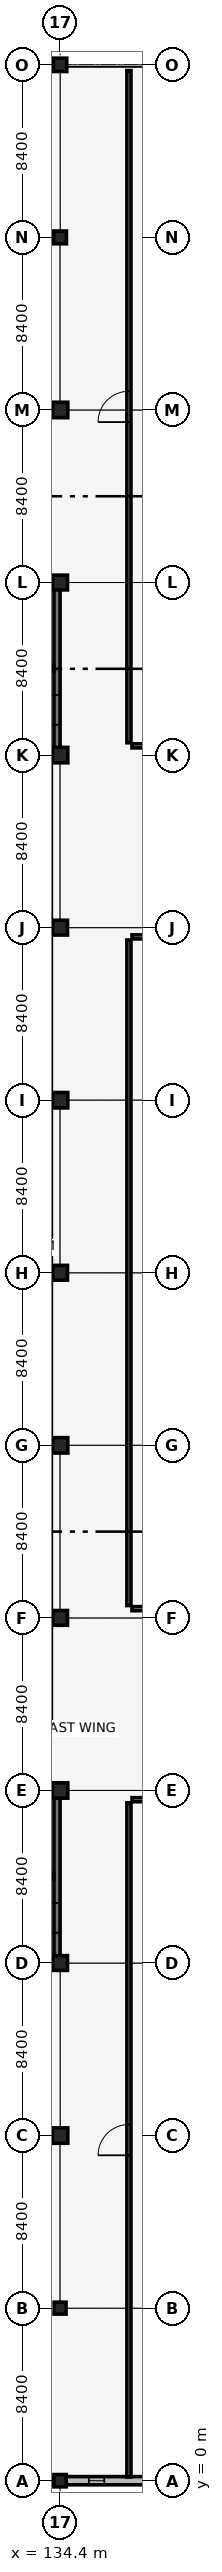
"""IFC4 building model, lengths in metres.
Left out: names, types, materials, properties, quantities, classifications, styles, units other than length and angle.
Written with IfcOpenShell. Run it as: python <this file> out.ifc"""

import sys

from ifc_helpers import new_model, si_unit, direction, frame, frame_2d, origin, origin_2d, place, context, subcontext, project, spatial, rectangle, extrude, element, fill, save


model = new_model("IFC4")
c1 = context("Model", 3, precision=1e-05, world=origin(), true_north=direction((0.0, 1.0)))
c2 = subcontext(c1, "Body", "Model", "MODEL_VIEW")
j1 = project(units=[si_unit("LENGTHUNIT", "METRE"), si_unit("PLANEANGLEUNIT", "RADIAN")], contexts=[c1])
p1 = place(None, origin())
s1 = spatial("IfcSite", under=j1, at=p1, CompositionType="ELEMENT")
p2 = place(p1, origin())
s2 = spatial("IfcBuilding", under=s1, at=p2, CompositionType="ELEMENT")
p3 = place(p2, frame((0.0, 0.0, 5.44)))
s3 = spatial("IfcBuildingStorey", under=s2, at=p3, CompositionType="ELEMENT", Elevation=5.44)
p4 = place(p3, frame((126.15, 25.35, 0.0), z_axis=(0.0, 0.0, 1.0), x_axis=(1.0, 0.0, 0.0)))
e1 = element("IfcWall", 1, at=p4, inside=s3, PredefinedType="SHEAR", context=c2, shape_type="SweptSolid", body=[
    extrude(rectangle(XDim=8.1, YDim=0.3, at=frame_2d((4.05, 0.0))), origin(), (0.0, 0.0, 1.0), 4.12),
])
p5 = place(p4, frame((0.485, 0.0, 0.0)))
e2 = element("IfcOpeningElement", 2, at=p5, cuts=e1, PredefinedType="OPENING", context=c2, shape_type="SweptSolid", body=[
    extrude(rectangle(XDim=1.0, YDim=2.15, at=frame_2d((0.5, 1.075))), frame((0.0, 0.16, 0.0), z_axis=(0.0, -1.0, 0.0), x_axis=(1.0, 0.0, 0.0)), (0.0, 0.0, 1.0), 0.32),
])
p6 = place(p3, frame((126.15, 33.45, 0.0), z_axis=(0.0, 0.0, 1.0), x_axis=(1.0, 0.0, 0.0)))
e3 = element("IfcWall", 3, at=p6, inside=s3, PredefinedType="SHEAR", context=c2, shape_type="SweptSolid", body=[
    extrude(rectangle(XDim=8.1, YDim=0.3, at=frame_2d((4.05, 0.0))), origin(), (0.0, 0.0, 1.0), 4.12),
])
p7 = place(p3, frame((134.25, 25.35, 0.0), z_axis=(0.0, 0.0, 1.0), x_axis=(0.0, 1.0, 0.0)))
e4 = element("IfcWall", 4, at=p7, inside=s3, PredefinedType="SHEAR", context=c2, shape_type="SweptSolid", body=[
    extrude(rectangle(XDim=8.1, YDim=0.3, at=frame_2d((4.05, 0.0))), origin(), (0.0, 0.0, 1.0), 4.12),
])
p8 = place(p7, frame((1.325, 0.0, 0.0)))
e5 = element("IfcOpeningElement", 5, at=p8, cuts=e4, PredefinedType="OPENING", context=c2, shape_type="SweptSolid", body=[
    extrude(rectangle(XDim=1.45, YDim=2.15, at=frame_2d((0.725, 1.075))), frame((0.0, 0.16, 0.0), z_axis=(0.0, -1.0, 0.0), x_axis=(1.0, 0.0, 0.0)), (0.0, 0.0, 1.0), 0.32),
])
p9 = place(p3, frame((126.3, 29.43, 0.0), z_axis=(0.0, 0.0, 1.0), x_axis=(1.0, 0.0, 0.0)))
e6 = element("IfcWall", 6, at=p9, inside=s3, PredefinedType="SHEAR", context=c2, shape_type="SweptSolid", body=[
    extrude(rectangle(XDim=7.8, YDim=0.3, at=frame_2d((3.9, 0.0))), origin(), (0.0, 0.0, 1.0), 4.12),
])
p10 = place(p9, frame((6.2, 0.0, 0.0)))
e7 = element("IfcOpeningElement", 7, at=p10, cuts=e6, PredefinedType="OPENING", context=c2, shape_type="SweptSolid", body=[
    extrude(rectangle(XDim=1.35, YDim=2.15, at=frame_2d((0.675, 1.075))), frame((0.0, 0.16, 0.0), z_axis=(0.0, -1.0, 0.0), x_axis=(1.0, 0.0, 0.0)), (0.0, 0.0, 1.0), 0.32),
])
p11 = place(p3, frame((126.15, 84.15, 0.0), z_axis=(0.0, 0.0, 1.0), x_axis=(1.0, 0.0, 0.0)))
e8 = element("IfcWall", 8, at=p11, inside=s3, PredefinedType="SHEAR", context=c2, shape_type="SweptSolid", body=[
    extrude(rectangle(XDim=8.1, YDim=0.3, at=frame_2d((4.05, 0.0))), origin(), (0.0, 0.0, 1.0), 4.12),
])
p12 = place(p11, frame((0.485, 0.0, 0.0)))
e9 = element("IfcOpeningElement", 9, at=p12, cuts=e8, PredefinedType="OPENING", context=c2, shape_type="SweptSolid", body=[
    extrude(rectangle(XDim=1.0, YDim=2.15, at=frame_2d((0.5, 1.075))), frame((0.0, 0.16, 0.0), z_axis=(0.0, -1.0, 0.0), x_axis=(1.0, 0.0, 0.0)), (0.0, 0.0, 1.0), 0.32),
])
p13 = place(p3, frame((126.15, 92.25, 0.0), z_axis=(0.0, 0.0, 1.0), x_axis=(1.0, 0.0, 0.0)))
e10 = element("IfcWall", 10, at=p13, inside=s3, PredefinedType="SHEAR", context=c2, shape_type="SweptSolid", body=[
    extrude(rectangle(XDim=8.1, YDim=0.3, at=frame_2d((4.05, 0.0))), origin(), (0.0, 0.0, 1.0), 4.12),
])
p14 = place(p3, frame((134.25, 84.15, 0.0), z_axis=(0.0, 0.0, 1.0), x_axis=(0.0, 1.0, 0.0)))
e11 = element("IfcWall", 11, at=p14, inside=s3, PredefinedType="SHEAR", context=c2, shape_type="SweptSolid", body=[
    extrude(rectangle(XDim=8.1, YDim=0.3, at=frame_2d((4.05, 0.0))), origin(), (0.0, 0.0, 1.0), 4.12),
])
p15 = place(p14, frame((1.325, 0.0, 0.0)))
e12 = element("IfcOpeningElement", 12, at=p15, cuts=e11, PredefinedType="OPENING", context=c2, shape_type="SweptSolid", body=[
    extrude(rectangle(XDim=1.45, YDim=2.15, at=frame_2d((0.725, 1.075))), frame((0.0, 0.16, 0.0), z_axis=(0.0, -1.0, 0.0), x_axis=(1.0, 0.0, 0.0)), (0.0, 0.0, 1.0), 0.32),
])
p16 = place(p3, frame((126.3, 88.23, 0.0), z_axis=(0.0, 0.0, 1.0), x_axis=(1.0, 0.0, 0.0)))
e13 = element("IfcWall", 13, at=p16, inside=s3, PredefinedType="SHEAR", context=c2, shape_type="SweptSolid", body=[
    extrude(rectangle(XDim=7.8, YDim=0.3, at=frame_2d((3.9, 0.0))), origin(), (0.0, 0.0, 1.0), 4.12),
])
p17 = place(p16, frame((6.2, 0.0, 0.0)))
e14 = element("IfcOpeningElement", 14, at=p17, cuts=e13, PredefinedType="OPENING", context=c2, shape_type="SweptSolid", body=[
    extrude(rectangle(XDim=1.35, YDim=2.15, at=frame_2d((0.675, 1.075))), frame((0.0, 0.16, 0.0), z_axis=(0.0, -1.0, 0.0), x_axis=(1.0, 0.0, 0.0)), (0.0, 0.0, 1.0), 0.32),
])
p18 = place(p3, frame((134.4, 0.0, 0.0), z_axis=(0.0, 0.0, 1.0), x_axis=(1.0, 0.0, 0.0)))
e15 = element("IfcColumn", 15, at=p18, inside=s3, PredefinedType="COLUMN", context=c2, shape_type="SweptSolid", body=[
    extrude(rectangle(XDim=0.6, YDim=0.6, at=origin_2d()), origin(), (0.0, 0.0, 1.0), 4.12),
])
p19 = place(p3, frame((134.4, 8.4, 0.0), z_axis=(0.0, 0.0, 1.0), x_axis=(1.0, 0.0, 0.0)))
e16 = element("IfcColumn", 16, at=p19, inside=s3, PredefinedType="COLUMN", context=c2, shape_type="SweptSolid", body=[
    extrude(rectangle(XDim=0.58, YDim=0.58, at=origin_2d()), origin(), (0.0, 0.0, 1.0), 4.12),
])
p20 = place(p3, frame((134.4, 16.8, 0.0), z_axis=(0.0, 0.0, 1.0), x_axis=(1.0, 0.0, 0.0)))
e17 = element("IfcColumn", 17, at=p20, inside=s3, PredefinedType="COLUMN", context=c2, shape_type="SweptSolid", body=[
    extrude(rectangle(XDim=0.75, YDim=0.75, at=origin_2d()), origin(), (0.0, 0.0, 1.0), 4.12),
])
p21 = place(p3, frame((134.4, 25.2, 0.0), z_axis=(0.0, 0.0, 1.0), x_axis=(1.0, 0.0, 0.0)))
e18 = element("IfcColumn", 18, at=p21, inside=s3, PredefinedType="COLUMN", context=c2, shape_type="SweptSolid", body=[
    extrude(rectangle(XDim=0.72, YDim=0.72, at=origin_2d()), origin(), (0.0, 0.0, 1.0), 4.12),
])
p22 = place(p3, frame((134.4, 33.6, 0.0), z_axis=(0.0, 0.0, 1.0), x_axis=(1.0, 0.0, 0.0)))
e19 = element("IfcColumn", 19, at=p22, inside=s3, PredefinedType="COLUMN", context=c2, shape_type="SweptSolid", body=[
    extrude(rectangle(XDim=0.75, YDim=0.75, at=origin_2d()), origin(), (0.0, 0.0, 1.0), 4.12),
])
p23 = place(p3, frame((134.4, 42.0, 0.0), z_axis=(0.0, 0.0, 1.0), x_axis=(1.0, 0.0, 0.0)))
e20 = element("IfcColumn", 20, at=p23, inside=s3, PredefinedType="COLUMN", context=c2, shape_type="SweptSolid", body=[
    extrude(rectangle(XDim=0.72, YDim=0.72, at=origin_2d()), origin(), (0.0, 0.0, 1.0), 4.12),
])
p24 = place(p3, frame((134.4, 50.4, 0.0), z_axis=(0.0, 0.0, 1.0), x_axis=(1.0, 0.0, 0.0)))
e21 = element("IfcColumn", 21, at=p24, inside=s3, PredefinedType="COLUMN", context=c2, shape_type="SweptSolid", body=[
    extrude(rectangle(XDim=0.75, YDim=0.75, at=origin_2d()), origin(), (0.0, 0.0, 1.0), 4.12),
])
p25 = place(p3, frame((134.4, 58.8, 0.0), z_axis=(0.0, 0.0, 1.0), x_axis=(1.0, 0.0, 0.0)))
e22 = element("IfcColumn", 22, at=p25, inside=s3, PredefinedType="COLUMN", context=c2, shape_type="SweptSolid", body=[
    extrude(rectangle(XDim=0.72, YDim=0.72, at=origin_2d()), origin(), (0.0, 0.0, 1.0), 4.12),
])
p26 = place(p3, frame((134.4, 67.2, 0.0), z_axis=(0.0, 0.0, 1.0), x_axis=(1.0, 0.0, 0.0)))
e23 = element("IfcColumn", 23, at=p26, inside=s3, PredefinedType="COLUMN", context=c2, shape_type="SweptSolid", body=[
    extrude(rectangle(XDim=0.75, YDim=0.75, at=origin_2d()), origin(), (0.0, 0.0, 1.0), 4.12),
])
p27 = place(p3, frame((134.4, 75.6, 0.0), z_axis=(0.0, 0.0, 1.0), x_axis=(1.0, 0.0, 0.0)))
e24 = element("IfcColumn", 24, at=p27, inside=s3, PredefinedType="COLUMN", context=c2, shape_type="SweptSolid", body=[
    extrude(rectangle(XDim=0.72, YDim=0.72, at=origin_2d()), origin(), (0.0, 0.0, 1.0), 4.12),
])
p28 = place(p3, frame((134.4, 84.0, 0.0), z_axis=(0.0, 0.0, 1.0), x_axis=(1.0, 0.0, 0.0)))
e25 = element("IfcColumn", 25, at=p28, inside=s3, PredefinedType="COLUMN", context=c2, shape_type="SweptSolid", body=[
    extrude(rectangle(XDim=0.75, YDim=0.75, at=origin_2d()), origin(), (0.0, 0.0, 1.0), 4.12),
])
p29 = place(p3, frame((134.4, 92.4, 0.0), z_axis=(0.0, 0.0, 1.0), x_axis=(1.0, 0.0, 0.0)))
e26 = element("IfcColumn", 26, at=p29, inside=s3, PredefinedType="COLUMN", context=c2, shape_type="SweptSolid", body=[
    extrude(rectangle(XDim=0.72, YDim=0.72, at=origin_2d()), origin(), (0.0, 0.0, 1.0), 4.12),
])
p30 = place(p3, frame((134.4, 100.8, 0.0), z_axis=(0.0, 0.0, 1.0), x_axis=(1.0, 0.0, 0.0)))
e27 = element("IfcColumn", 27, at=p30, inside=s3, PredefinedType="COLUMN", context=c2, shape_type="SweptSolid", body=[
    extrude(rectangle(XDim=0.75, YDim=0.75, at=origin_2d()), origin(), (0.0, 0.0, 1.0), 4.12),
])
p31 = place(p3, frame((134.4, 109.2, 0.0), z_axis=(0.0, 0.0, 1.0), x_axis=(1.0, 0.0, 0.0)))
e28 = element("IfcColumn", 28, at=p31, inside=s3, PredefinedType="COLUMN", context=c2, shape_type="SweptSolid", body=[
    extrude(rectangle(XDim=0.62, YDim=0.62, at=origin_2d()), origin(), (0.0, 0.0, 1.0), 4.12),
])
p32 = place(p3, frame((134.4, 117.6, 0.0), z_axis=(0.0, 0.0, 1.0), x_axis=(1.0, 0.0, 0.0)))
e29 = element("IfcColumn", 29, at=p32, inside=s3, PredefinedType="COLUMN", context=c2, shape_type="SweptSolid", body=[
    extrude(rectangle(XDim=0.65, YDim=0.65, at=origin_2d()), origin(), (0.0, 0.0, 1.0), 4.12),
])
p33 = place(p3, frame((126.275, 0.0, 0.0), z_axis=(0.0, 0.0, 1.0), x_axis=(1.0, 0.0, 0.0)))
e30 = element("IfcWall", 30, at=p33, inside=s3, PredefinedType="SOLIDWALL", context=c2, shape_type="SweptSolid", body=[
    extrude(rectangle(XDim=7.84, YDim=0.38, at=frame_2d((3.92, 0.0))), origin(), (0.0, 0.0, 1.0), 3.38),
])
p34 = place(p33, frame((1.115, 0.0, 0.7)))
e31 = element("IfcOpeningElement", 31, at=p34, cuts=e30, PredefinedType="OPENING", context=c2, shape_type="SweptSolid", body=[
    extrude(rectangle(XDim=0.75, YDim=2.1, at=frame_2d((0.375, 1.05))), frame((0.0, 0.2, 0.0), z_axis=(0.0, -1.0, 0.0), x_axis=(1.0, 0.0, 0.0)), (0.0, 0.0, 1.0), 0.4),
])
p35 = place(p33, frame((2.683, 0.0, 0.7)))
e32 = element("IfcOpeningElement", 32, at=p35, cuts=e30, PredefinedType="OPENING", context=c2, shape_type="SweptSolid", body=[
    extrude(rectangle(XDim=0.75, YDim=2.1, at=frame_2d((0.375, 1.05))), frame((0.0, 0.2, 0.0), z_axis=(0.0, -1.0, 0.0), x_axis=(1.0, 0.0, 0.0)), (0.0, 0.0, 1.0), 0.4),
])
p36 = place(p33, frame((4.407, 0.0, 0.7)))
e33 = element("IfcOpeningElement", 33, at=p36, cuts=e30, PredefinedType="OPENING", context=c2, shape_type="SweptSolid", body=[
    extrude(rectangle(XDim=0.75, YDim=2.1, at=frame_2d((0.375, 1.05))), frame((0.0, 0.2, 0.0), z_axis=(0.0, -1.0, 0.0), x_axis=(1.0, 0.0, 0.0)), (0.0, 0.0, 1.0), 0.4),
])
p37 = place(p33, frame((5.975, 0.0, 0.7)))
e34 = element("IfcOpeningElement", 34, at=p37, cuts=e30, PredefinedType="OPENING", context=c2, shape_type="SweptSolid", body=[
    extrude(rectangle(XDim=0.75, YDim=2.1, at=frame_2d((0.375, 1.05))), frame((0.0, 0.2, 0.0), z_axis=(0.0, -1.0, 0.0), x_axis=(1.0, 0.0, 0.0)), (0.0, 0.0, 1.0), 0.4),
])
p38 = place(p3, frame((126.295, 117.6, 0.0), z_axis=(0.0, 0.0, 1.0), x_axis=(1.0, 0.0, 0.0)))
e35 = element("IfcWall", 35, at=p38, inside=s3, PredefinedType="SOLIDWALL", context=c2, shape_type="SweptSolid", body=[
    extrude(rectangle(XDim=7.795, YDim=0.38, at=frame_2d((3.897, 0.0))), origin(), (0.0, 0.0, 1.0), 3.38),
])
p39 = place(p38, frame((1.106, 0.0, 0.7)))
e36 = element("IfcOpeningElement", 36, at=p39, cuts=e35, PredefinedType="OPENING", context=c2, shape_type="SweptSolid", body=[
    extrude(rectangle(XDim=0.75, YDim=2.1, at=frame_2d((0.375, 1.05))), frame((0.0, 0.2, 0.0), z_axis=(0.0, -1.0, 0.0), x_axis=(1.0, 0.0, 0.0)), (0.0, 0.0, 1.0), 0.4),
])
p40 = place(p38, frame((2.665, 0.0, 0.7)))
e37 = element("IfcOpeningElement", 37, at=p40, cuts=e35, PredefinedType="OPENING", context=c2, shape_type="SweptSolid", body=[
    extrude(rectangle(XDim=0.75, YDim=2.1, at=frame_2d((0.375, 1.05))), frame((0.0, 0.2, 0.0), z_axis=(0.0, -1.0, 0.0), x_axis=(1.0, 0.0, 0.0)), (0.0, 0.0, 1.0), 0.4),
])
p41 = place(p38, frame((4.38, 0.0, 0.7)))
e38 = element("IfcOpeningElement", 38, at=p41, cuts=e35, PredefinedType="OPENING", context=c2, shape_type="SweptSolid", body=[
    extrude(rectangle(XDim=0.75, YDim=2.1, at=frame_2d((0.375, 1.05))), frame((0.0, 0.2, 0.0), z_axis=(0.0, -1.0, 0.0), x_axis=(1.0, 0.0, 0.0)), (0.0, 0.0, 1.0), 0.4),
])
p42 = place(p38, frame((5.939, 0.0, 0.7)))
e39 = element("IfcOpeningElement", 39, at=p42, cuts=e35, PredefinedType="OPENING", context=c2, shape_type="SweptSolid", body=[
    extrude(rectangle(XDim=0.75, YDim=2.1, at=frame_2d((0.375, 1.05))), frame((0.0, 0.2, 0.0), z_axis=(0.0, -1.0, 0.0), x_axis=(1.0, 0.0, 0.0)), (0.0, 0.0, 1.0), 0.4),
])
p43 = place(p3, frame((134.685, 0.0, 0.0), z_axis=(0.0, 0.0, 1.0), x_axis=(1.0, 0.0, 0.0)))
e40 = element("IfcWall", 40, at=p43, inside=s3, PredefinedType="SOLIDWALL", context=c2, shape_type="SweptSolid", body=[
    extrude(rectangle(XDim=7.84, YDim=0.4, at=frame_2d((3.92, 0.0))), origin(), (0.0, 0.0, 1.0), 3.38),
])
p44 = place(p43, frame((1.115, 0.0, 0.7)))
e41 = element("IfcOpeningElement", 41, at=p44, cuts=e40, PredefinedType="OPENING", context=c2, shape_type="SweptSolid", body=[
    extrude(rectangle(XDim=0.75, YDim=2.1, at=frame_2d((0.375, 1.05))), frame((0.0, 0.21, 0.0), z_axis=(0.0, -1.0, 0.0), x_axis=(1.0, 0.0, 0.0)), (0.0, 0.0, 1.0), 0.42),
])
p45 = place(p43, frame((4.407, 0.0, 0.7)))
e42 = element("IfcOpeningElement", 42, at=p45, cuts=e40, PredefinedType="OPENING", context=c2, shape_type="SweptSolid", body=[
    extrude(rectangle(XDim=0.75, YDim=2.1, at=frame_2d((0.375, 1.05))), frame((0.0, 0.21, 0.0), z_axis=(0.0, -1.0, 0.0), x_axis=(1.0, 0.0, 0.0)), (0.0, 0.0, 1.0), 0.42),
])
p46 = place(p43, frame((5.975, 0.0, 0.7)))
e43 = element("IfcOpeningElement", 43, at=p46, cuts=e40, PredefinedType="OPENING", context=c2, shape_type="SweptSolid", body=[
    extrude(rectangle(XDim=0.75, YDim=2.1, at=frame_2d((0.375, 1.05))), frame((0.0, 0.21, 0.0), z_axis=(0.0, -1.0, 0.0), x_axis=(1.0, 0.0, 0.0)), (0.0, 0.0, 1.0), 0.42),
])
p47 = place(p3, frame((137.75, 0.18, 0.0), z_axis=(0.0, 0.0, 1.0), x_axis=(0.0, 1.0, 0.0)))
e44 = element("IfcWall", 44, at=p47, inside=s3, PredefinedType="PARTITIONING", context=c2, shape_type="SweptSolid", body=[
    extrude(rectangle(XDim=32.82, YDim=0.2, at=frame_2d((16.41, 0.0))), origin(), (0.0, 0.0, 1.0), 3.34),
])
p48 = place(p47, frame((15.66, 0.0, 0.0)))
e45 = element("IfcOpeningElement", 45, at=p48, cuts=e44, PredefinedType="OPENING", context=c2, shape_type="SweptSolid", body=[
    extrude(rectangle(XDim=1.5, YDim=2.2, at=frame_2d((0.75, 1.1))), frame((0.0, 0.11, 0.0), z_axis=(0.0, -1.0, 0.0), x_axis=(1.0, 0.0, 0.0)), (0.0, 0.0, 1.0), 0.22),
])
p49 = place(p3, frame((137.9, 33.15, 0.0), z_axis=(0.0, 0.0, 1.0), x_axis=(1.0, 0.0, 0.0)))
e46 = element("IfcWall", 46, at=p49, inside=s3, PredefinedType="PARTITIONING", context=c2, shape_type="SweptSolid", body=[
    extrude(rectangle(XDim=4.48, YDim=0.2, at=frame_2d((2.24, 0.0))), origin(), (0.0, 0.0, 1.0), 4.12),
])
p50 = place(p3, frame((137.9, 75.15, 0.0), z_axis=(0.0, 0.0, 1.0), x_axis=(1.0, 0.0, 0.0)))
e47 = element("IfcWall", 47, at=p50, inside=s3, PredefinedType="PARTITIONING", context=c2, shape_type="SweptSolid", body=[
    extrude(rectangle(XDim=4.465, YDim=0.2, at=frame_2d((2.232, 0.0))), origin(), (0.0, 0.0, 1.0), 4.12),
])
p51 = place(p50, frame((1.482, 0.0, 0.0)))
e48 = element("IfcOpeningElement", 48, at=p51, cuts=e47, PredefinedType="OPENING", context=c2, shape_type="SweptSolid", body=[
    extrude(rectangle(XDim=1.5, YDim=2.2, at=frame_2d((0.75, 1.1))), frame((0.0, 0.11, 0.0), z_axis=(0.0, -1.0, 0.0), x_axis=(1.0, 0.0, 0.0)), (0.0, 0.0, 1.0), 0.22),
])
p52 = place(p3, frame((137.75, 42.6, 0.0), z_axis=(0.0, 0.0, 1.0), x_axis=(0.0, 1.0, 0.0)))
e49 = element("IfcWall", 49, at=p52, inside=s3, PredefinedType="PARTITIONING", context=c2, shape_type="SweptSolid", body=[
    extrude(rectangle(XDim=32.4, YDim=0.2, at=frame_2d((16.2, 0.0))), origin(), (0.0, 0.0, 1.0), 3.34),
])
p53 = place(p3, frame((137.9, 42.45, 0.0), z_axis=(0.0, 0.0, 1.0), x_axis=(1.0, 0.0, 0.0)))
e50 = element("IfcWall", 50, at=p53, inside=s3, PredefinedType="PARTITIONING", context=c2, shape_type="SweptSolid", body=[
    extrude(rectangle(XDim=4.465, YDim=0.2, at=frame_2d((2.232, 0.0))), origin(), (0.0, 0.0, 1.0), 4.12),
])
p54 = place(p3, frame((137.75, 84.6, 0.0), z_axis=(0.0, 0.0, 1.0), x_axis=(0.0, 1.0, 0.0)))
e51 = element("IfcWall", 51, at=p54, inside=s3, PredefinedType="PARTITIONING", context=c2, shape_type="SweptSolid", body=[
    extrude(rectangle(XDim=32.72, YDim=0.2, at=frame_2d((16.36, 0.0))), origin(), (0.0, 0.0, 1.0), 3.34),
])
p55 = place(p54, frame((15.61, 0.0, 0.0)))
e52 = element("IfcOpeningElement", 52, at=p55, cuts=e51, PredefinedType="OPENING", context=c2, shape_type="SweptSolid", body=[
    extrude(rectangle(XDim=1.5, YDim=2.2, at=frame_2d((0.75, 1.1))), frame((0.0, 0.11, 0.0), z_axis=(0.0, -1.0, 0.0), x_axis=(1.0, 0.0, 0.0)), (0.0, 0.0, 1.0), 0.22),
])
p56 = place(p3, frame((137.9, 84.45, 0.0), z_axis=(0.0, 0.0, 1.0), x_axis=(1.0, 0.0, 0.0)))
e53 = element("IfcWall", 53, at=p56, inside=s3, PredefinedType="PARTITIONING", context=c2, shape_type="SweptSolid", body=[
    extrude(rectangle(XDim=4.48, YDim=0.2, at=frame_2d((2.24, 0.0))), origin(), (0.0, 0.0, 1.0), 4.12),
])
p57 = place(p44, origin())
e54 = element("IfcWindow", 54, at=p57, inside=s3, PartitioningType="DOUBLE_PANEL_VERTICAL", PredefinedType="WINDOW", context=c2, shape_type="SweptSolid", body=[
    extrude(rectangle(XDim=0.75, YDim=2.1, at=frame_2d((0.375, 1.05))), frame((0.0, 0.03, 0.0), z_axis=(0.0, -1.0, 0.0), x_axis=(1.0, 0.0, 0.0)), (0.0, 0.0, 1.0), 0.06),
])
fill(e41, e54)
p58 = place(p8, origin())
e55 = element("IfcDoor", 55, at=p58, inside=s3, OperationType="DOUBLE_DOOR_SINGLE_SWING", PredefinedType="DOOR", context=c2, shape_type="SweptSolid", body=[
    extrude(rectangle(XDim=1.45, YDim=2.15, at=frame_2d((0.725, 1.075))), frame((0.0, 0.025, 0.0), z_axis=(0.0, -1.0, 0.0), x_axis=(1.0, 0.0, 0.0)), (0.0, 0.0, 1.0), 0.05),
])
fill(e5, e55)
p59 = place(p15, origin())
e56 = element("IfcDoor", 56, at=p59, inside=s3, OperationType="DOUBLE_DOOR_SINGLE_SWING", PredefinedType="DOOR", context=c2, shape_type="SweptSolid", body=[
    extrude(rectangle(XDim=1.45, YDim=2.15, at=frame_2d((0.725, 1.075))), frame((0.0, 0.025, 0.0), z_axis=(0.0, -1.0, 0.0), x_axis=(1.0, 0.0, 0.0)), (0.0, 0.0, 1.0), 0.05),
])
fill(e12, e56)
p60 = place(p48, origin())
e57 = element("IfcDoor", 57, at=p60, inside=s3, OperationType="DOUBLE_DOOR_SINGLE_SWING", PredefinedType="DOOR", context=c2, shape_type="SweptSolid", body=[
    extrude(rectangle(XDim=1.5, YDim=2.2, at=frame_2d((0.75, 1.1))), frame((0.0, 0.025, 0.0), z_axis=(0.0, -1.0, 0.0), x_axis=(1.0, 0.0, 0.0)), (0.0, 0.0, 1.0), 0.05),
])
fill(e45, e57)
p61 = place(p55, origin())
e58 = element("IfcDoor", 58, at=p61, inside=s3, OperationType="DOUBLE_DOOR_SINGLE_SWING", PredefinedType="DOOR", context=c2, shape_type="SweptSolid", body=[
    extrude(rectangle(XDim=1.5, YDim=2.2, at=frame_2d((0.75, 1.1))), frame((0.0, 0.025, 0.0), z_axis=(0.0, -1.0, 0.0), x_axis=(1.0, 0.0, 0.0)), (0.0, 0.0, 1.0), 0.05),
])
fill(e52, e58)
save(model, sys.argv[1])
